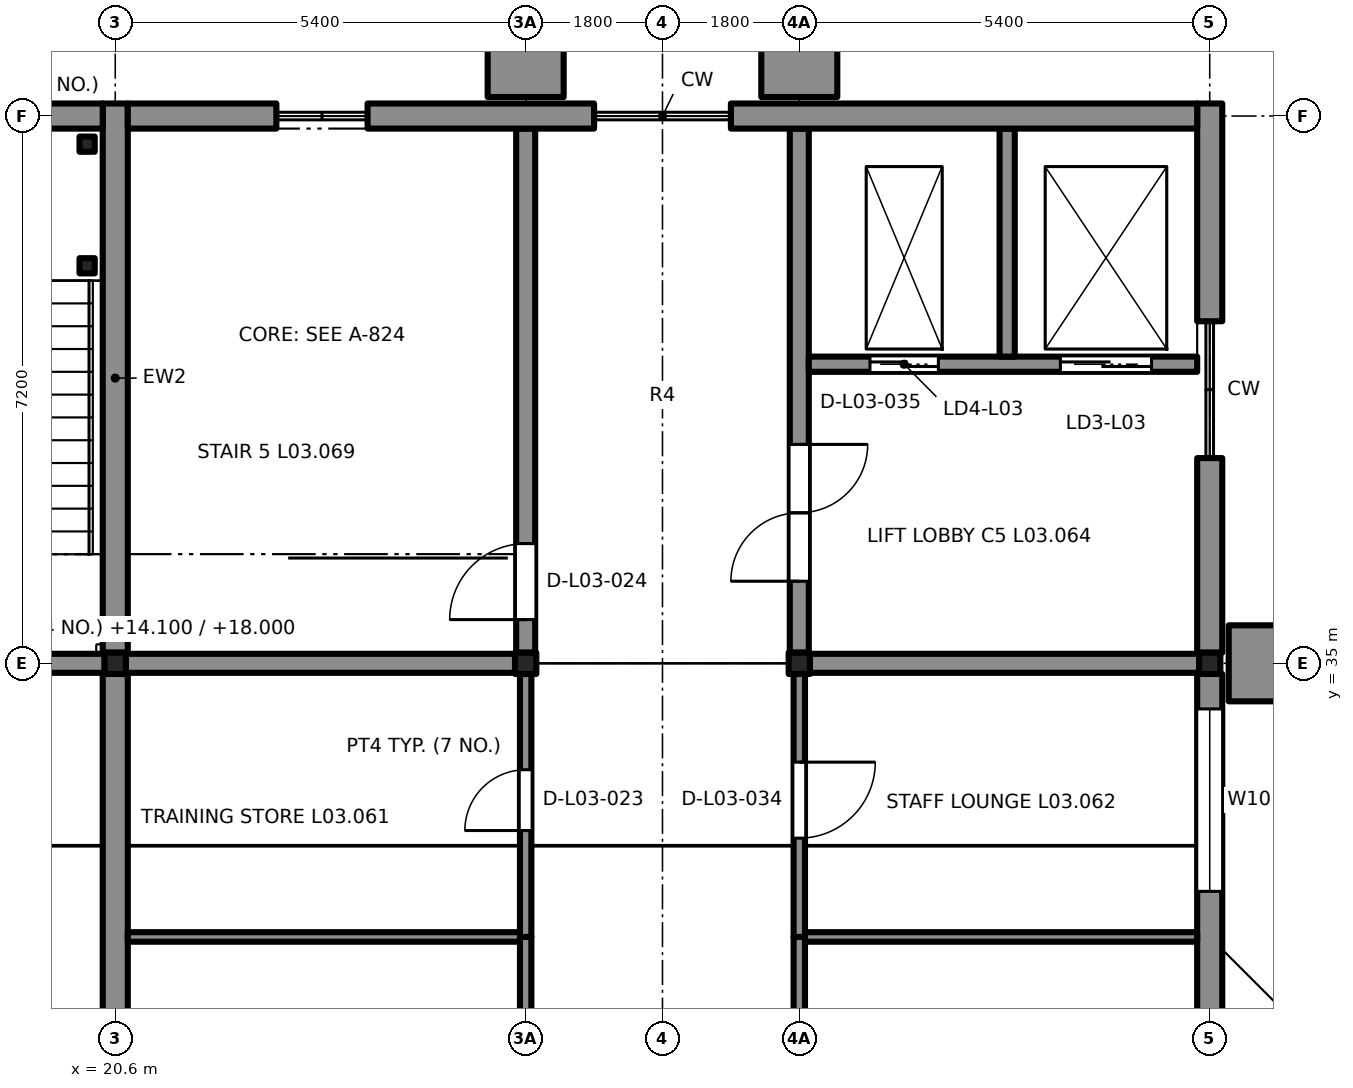
"""IFC4 building model, lengths in metres.
Left out: names, types, materials, properties, quantities, classifications, styles, units other than length and angle.
Written with IfcOpenShell. Run it as: python <this file> out.ifc"""

import sys

from ifc_helpers import new_model, si_unit, direction, frame, frame_2d, origin, origin_2d, place, context, subcontext, project, spatial, rectangle, extrude, element, fill, save


model = new_model("IFC4")
c1 = context("Model", 3, precision=1e-05, world=origin(), true_north=direction((0.0, 1.0)))
c2 = subcontext(c1, "Body", "Model", "MODEL_VIEW")
j1 = project(units=[si_unit("LENGTHUNIT", "METRE"), si_unit("PLANEANGLEUNIT", "RADIAN")], contexts=[c1])
p1 = place(None, origin())
s1 = spatial("IfcSite", under=j1, at=p1, CompositionType="ELEMENT")
p2 = place(p1, origin())
s2 = spatial("IfcBuilding", under=s1, at=p2, CompositionType="ELEMENT")
p3 = place(p2, frame((0.0, 0.0, 14.1)))
s3 = spatial("IfcBuildingStorey", under=s2, at=p3, CompositionType="ELEMENT", Elevation=14.1)
for number, where, z_axis, x_axis in (
    (1, (20.6, 35.0, 0.0), (0.0, 0.0, 1.0), (1.0, 0.0, 0.0)),
    (2, (26.0, 35.0, 0.0), (0.0, 0.0, 1.0), (1.0, 0.0, 0.0)),
    (3, (29.6, 35.0, 0.0), (0.0, 0.0, 1.0), (1.0, 0.0, 0.0)),
    (4, (35.0, 35.0, 0.0), (0.0, 0.0, 1.0), (1.0, 0.0, 0.0)),
):
    element("IfcColumn", number, at=place(p3, frame(where, z_axis=z_axis, x_axis=x_axis)), inside=s3, PredefinedType="COLUMN", context=c2, shape_type="SweptSolid", body=[
        extrude(rectangle(XDim=0.28, YDim=0.28, at=origin_2d()), origin(), (0.0, 0.0, 1.0), 3.9),
    ])
p4 = place(p3, frame((15.34, 35.0, 0.0), z_axis=(0.0, 0.0, 1.0), x_axis=(1.0, 0.0, 0.0)))
e5 = element("IfcWall", 5, at=p4, inside=s3, PredefinedType="SHEAR", context=c2, shape_type="SweptSolid", body=[
    extrude(rectangle(XDim=5.12, YDim=0.25, at=frame_2d((2.56, 0.0))), origin(), (0.0, 0.0, 1.0), 3.2),
])
for number, where, z_axis, x_axis in (
    (6, (20.23, 41.83, 0.0), (0.0, 0.0, 1.0), (1.0, 0.0, 0.0)),
    (7, (20.23, 40.23, 0.0), (0.0, 0.0, 1.0), (1.0, 0.0, 0.0)),
):
    element("IfcColumn", number, at=place(p3, frame(where, z_axis=z_axis, x_axis=x_axis)), inside=s3, PredefinedType="COLUMN", context=c2, shape_type="SweptSolid", body=[
        extrude(rectangle(XDim=0.2, YDim=0.2, at=origin_2d()), origin(), (0.0, 0.0, 1.0), 1.75),
    ])
p5 = place(p3, frame((26.0, 35.14, 0.0), z_axis=(0.0, 0.0, 1.0), x_axis=(0.0, 1.0, 0.0)))
e8 = element("IfcWall", 8, at=p5, inside=s3, PredefinedType="SHEAR", context=c2, shape_type="SweptSolid", body=[
    extrude(rectangle(XDim=6.895, YDim=0.25, at=frame_2d((3.448, 0.0))), origin(), (0.0, 0.0, 1.0), 3.2),
])
p6 = place(p5, frame((0.435, 0.0, 0.0)))
e9 = element("IfcOpeningElement", 9, at=p6, cuts=e8, PredefinedType="OPENING", context=c2, shape_type="SweptSolid", body=[
    extrude(rectangle(XDim=1.0, YDim=2.1, at=frame_2d((0.5, 1.05))), frame((0.0, 0.135, 0.0), z_axis=(0.0, -1.0, 0.0), x_axis=(1.0, 0.0, 0.0)), (0.0, 0.0, 1.0), 0.27),
])
p7 = place(p3, frame((20.74, 35.0, 0.0), z_axis=(0.0, 0.0, 1.0), x_axis=(1.0, 0.0, 0.0)))
e10 = element("IfcWall", 10, at=p7, inside=s3, PredefinedType="SHEAR", context=c2, shape_type="SweptSolid", body=[
    extrude(rectangle(XDim=5.12, YDim=0.25, at=frame_2d((2.56, 0.0))), origin(), (0.0, 0.0, 1.0), 3.2),
])
p8 = place(p3, frame((29.6, 35.14, 0.0), z_axis=(0.0, 0.0, 1.0), x_axis=(0.0, 1.0, 0.0)))
e11 = element("IfcWall", 11, at=p8, inside=s3, PredefinedType="SHEAR", context=c2, shape_type="SweptSolid", body=[
    extrude(rectangle(XDim=6.895, YDim=0.25, at=frame_2d((3.448, 0.0))), origin(), (0.0, 0.0, 1.0), 3.2),
])
p9 = place(p8, frame((0.94, 0.0, 0.0)))
e12 = element("IfcOpeningElement", 12, at=p9, cuts=e11, PredefinedType="OPENING", context=c2, shape_type="SweptSolid", body=[
    extrude(rectangle(XDim=1.8, YDim=2.1, at=frame_2d((0.9, 1.05))), frame((0.0, 0.135, 0.0), z_axis=(0.0, -1.0, 0.0), x_axis=(1.0, 0.0, 0.0)), (0.0, 0.0, 1.0), 0.27),
])
p10 = place(p3, frame((29.74, 35.0, 0.0), z_axis=(0.0, 0.0, 1.0), x_axis=(1.0, 0.0, 0.0)))
e13 = element("IfcWall", 13, at=p10, inside=s3, PredefinedType="SHEAR", context=c2, shape_type="SweptSolid", body=[
    extrude(rectangle(XDim=5.12, YDim=0.25, at=frame_2d((2.56, 0.0))), origin(), (0.0, 0.0, 1.0), 3.2),
])
p11 = place(p3, frame((29.725, 38.935, 0.0), z_axis=(0.0, 0.0, 1.0), x_axis=(1.0, 0.0, 0.0)))
e14 = element("IfcWall", 14, at=p11, inside=s3, PredefinedType="SHEAR", context=c2, shape_type="SweptSolid", body=[
    extrude(rectangle(XDim=5.11, YDim=0.2, at=frame_2d((2.555, 0.0))), origin(), (0.0, 0.0, 1.0), 3.2),
])
p12 = place(p11, frame((3.31, 0.0, 0.0)))
e15 = element("IfcOpeningElement", 15, at=p12, cuts=e14, PredefinedType="OPENING", context=c2, shape_type="SweptSolid", body=[
    extrude(rectangle(XDim=1.2, YDim=2.1, at=frame_2d((0.6, 1.05))), frame((0.0, 0.11, 0.0), z_axis=(0.0, -1.0, 0.0), x_axis=(1.0, 0.0, 0.0)), (0.0, 0.0, 1.0), 0.22),
])
p13 = place(p11, frame((0.805, 0.0, 0.0)))
e16 = element("IfcOpeningElement", 16, at=p13, cuts=e14, PredefinedType="OPENING", context=c2, shape_type="SweptSolid", body=[
    extrude(rectangle(XDim=0.9, YDim=2.1, at=frame_2d((0.45, 1.05))), frame((0.0, 0.11, 0.0), z_axis=(0.0, -1.0, 0.0), x_axis=(1.0, 0.0, 0.0)), (0.0, 0.0, 1.0), 0.22),
])
p14 = place(p3, frame((32.335, 42.035, 0.0), z_axis=(0.0, 0.0, 1.0), x_axis=(0.0, -1.0, 0.0)))
e17 = element("IfcWall", 17, at=p14, inside=s3, PredefinedType="SHEAR", context=c2, shape_type="SweptSolid", body=[
    extrude(rectangle(XDim=3.0, YDim=0.2, at=frame_2d((1.5, 0.0))), origin(), (0.0, 0.0, 1.0), 3.2),
])
p15 = place(p3, frame((20.6, 34.86, 0.0), z_axis=(0.0, 0.0, 1.0), x_axis=(0.0, -1.0, 0.0)))
e18 = element("IfcWall", 18, at=p15, inside=s3, PredefinedType="SOLIDWALL", context=c2, shape_type="SweptSolid", body=[
    extrude(rectangle(XDim=6.92, YDim=0.33, at=frame_2d((3.46, 0.0))), origin(), (0.0, 0.0, 1.0), 3.2),
])
p16 = place(p3, frame((20.6, 42.365, 0.0), z_axis=(0.0, 0.0, 1.0), x_axis=(0.0, -1.0, 0.0)))
e19 = element("IfcWall", 19, at=p16, inside=s3, PredefinedType="SOLIDWALL", context=c2, shape_type="SweptSolid", body=[
    extrude(rectangle(XDim=7.225, YDim=0.33, at=frame_2d((3.613, 0.0))), origin(), (0.0, 0.0, 1.0), 3.2),
])
p17 = place(p3, frame((18.48, 42.2, 0.0), z_axis=(0.0, 0.0, 1.0), x_axis=(1.0, 0.0, 0.0)))
e20 = element("IfcWall", 20, at=p17, inside=s3, PredefinedType="SOLIDWALL", context=c2, shape_type="SweptSolid", body=[
    extrude(rectangle(XDim=1.955, YDim=0.33, at=frame_2d((0.978, 0.0))), origin(), (0.0, 0.0, 1.0), 3.2),
])
p18 = place(p3, frame((35.0, 34.86, 0.0), z_axis=(0.0, 0.0, 1.0), x_axis=(0.0, -1.0, 0.0)))
e21 = element("IfcWall", 21, at=p18, inside=s3, PredefinedType="SOLIDWALL", context=c2, shape_type="SweptSolid", body=[
    extrude(rectangle(XDim=6.92, YDim=0.33, at=frame_2d((3.46, 0.0))), origin(), (0.0, 0.0, 1.0), 3.2),
])
p19 = place(p18, frame((4.66, 0.0, 0.9)))
e22 = element("IfcOpeningElement", 22, at=p19, cuts=e21, PredefinedType="OPENING", context=c2, shape_type="SweptSolid", body=[
    extrude(rectangle(XDim=1.2, YDim=1.5, at=frame_2d((0.6, 0.75))), frame((0.0, 0.175, 0.0), z_axis=(0.0, -1.0, 0.0), x_axis=(1.0, 0.0, 0.0)), (0.0, 0.0, 1.0), 0.35),
])
p20 = place(p18, frame((0.46, 0.0, 0.45)))
e23 = element("IfcOpeningElement", 23, at=p20, cuts=e21, PredefinedType="OPENING", context=c2, shape_type="SweptSolid", body=[
    extrude(rectangle(XDim=2.4, YDim=2.1, at=frame_2d((1.2, 1.05))), frame((0.0, 0.175, 0.0), z_axis=(0.0, -1.0, 0.0), x_axis=(1.0, 0.0, 0.0)), (0.0, 0.0, 1.0), 0.35),
])
p21 = place(p3, frame((35.0, 37.7, 0.0), z_axis=(0.0, 0.0, 1.0), x_axis=(0.0, -1.0, 0.0)))
e24 = element("IfcWall", 24, at=p21, inside=s3, PredefinedType="SOLIDWALL", context=c2, shape_type="SweptSolid", body=[
    extrude(rectangle(XDim=2.56, YDim=0.33, at=frame_2d((1.28, 0.0))), origin(), (0.0, 0.0, 1.0), 3.2),
])
p22 = place(p3, frame((35.0, 42.365, 0.0), z_axis=(0.0, 0.0, 1.0), x_axis=(0.0, -1.0, 0.0)))
e25 = element("IfcWall", 25, at=p22, inside=s3, PredefinedType="SOLIDWALL", context=c2, shape_type="SweptSolid", body=[
    extrude(rectangle(XDim=2.865, YDim=0.33, at=frame_2d((1.433, 0.0))), origin(), (0.0, 0.0, 1.0), 3.2),
])
p23 = place(p3, frame((35.625, 35.5, 0.0), z_axis=(0.0, 0.0, 1.0), x_axis=(0.0, -1.0, 0.0)))
e26 = element("IfcWall", 26, at=p23, inside=s3, PredefinedType="SOLIDWALL", context=c2, shape_type="SweptSolid", body=[
    extrude(rectangle(XDim=1.0, YDim=0.75, at=frame_2d((0.5, 0.0))), origin(), (0.0, 0.0, 1.0), 3.9),
])
p24 = place(p3, frame((20.765, 42.2, 0.0), z_axis=(0.0, 0.0, 1.0), x_axis=(1.0, 0.0, 0.0)))
e27 = element("IfcWall", 27, at=p24, inside=s3, PredefinedType="SOLIDWALL", context=c2, shape_type="SweptSolid", body=[
    extrude(rectangle(XDim=1.955, YDim=0.33, at=frame_2d((0.978, 0.0))), origin(), (0.0, 0.0, 1.0), 3.2),
])
p25 = place(p3, frame((23.92, 42.2, 0.0), z_axis=(0.0, 0.0, 1.0), x_axis=(1.0, 0.0, 0.0)))
e28 = element("IfcWall", 28, at=p25, inside=s3, PredefinedType="SOLIDWALL", context=c2, shape_type="SweptSolid", body=[
    extrude(rectangle(XDim=2.98, YDim=0.33, at=frame_2d((1.49, 0.0))), origin(), (0.0, 0.0, 1.0), 3.2),
])
p26 = place(p3, frame((28.7, 42.2, 0.0), z_axis=(0.0, 0.0, 1.0), x_axis=(1.0, 0.0, 0.0)))
e29 = element("IfcWall", 29, at=p26, inside=s3, PredefinedType="SOLIDWALL", context=c2, shape_type="SweptSolid", body=[
    extrude(rectangle(XDim=6.135, YDim=0.33, at=frame_2d((3.067, 0.0))), origin(), (0.0, 0.0, 1.0), 3.2),
])
for number, where, z_axis, x_axis in (
    (30, (25.5, 42.825, 0.0), (0.0, 0.0, 1.0), (1.0, 0.0, 0.0)),
    (31, (29.1, 42.825, 0.0), (0.0, 0.0, 1.0), (1.0, 0.0, 0.0)),
):
    element("IfcWall", number, at=place(p3, frame(where, z_axis=z_axis, x_axis=x_axis)), inside=s3, PredefinedType="SOLIDWALL", context=c2, shape_type="SweptSolid", body=[
        extrude(rectangle(XDim=1.0, YDim=0.75, at=frame_2d((0.5, 0.0))), origin(), (0.0, 0.0, 1.0), 3.9),
    ])
p27 = place(p3, frame((22.1, 42.15, 3.9), z_axis=(0.0, 0.0, 1.0), x_axis=(1.0, 0.0, 0.0)))
e32 = element("IfcWall", 32, at=p27, inside=s3, PredefinedType="SOLIDWALL", context=c2, shape_type="SweptSolid", body=[
    extrude(rectangle(XDim=1.5, YDim=0.23, at=frame_2d((0.75, 0.0))), origin(), (0.0, 0.0, 1.0), 2.4),
])
p28 = place(p3, frame((23.6, 42.15, 3.9), z_axis=(0.0, 0.0, 1.0), x_axis=(1.0, 0.0, 0.0)))
e33 = element("IfcWall", 33, at=p28, inside=s3, PredefinedType="SOLIDWALL", context=c2, shape_type="SweptSolid", body=[
    extrude(rectangle(XDim=1.2, YDim=0.23, at=frame_2d((0.6, 0.0))), origin(), (0.0, 0.0, 1.0), 3.4),
])
p29 = place(p3, frame((24.8, 42.15, 3.9), z_axis=(0.0, 0.0, 1.0), x_axis=(1.0, 0.0, 0.0)))
e34 = element("IfcWall", 34, at=p29, inside=s3, PredefinedType="SOLIDWALL", context=c2, shape_type="SweptSolid", body=[
    extrude(rectangle(XDim=1.5, YDim=0.23, at=frame_2d((0.75, 0.0))), origin(), (0.0, 0.0, 1.0), 2.4),
])
for number, where, z_axis, x_axis in (
    (35, (26.3, 42.15, 3.9), (0.0, 0.0, 1.0), (1.0, 0.0, 0.0)),
    (36, (27.8, 42.15, 3.9), (0.0, 0.0, 1.0), (1.0, 0.0, 0.0)),
):
    element("IfcWall", number, at=place(p3, frame(where, z_axis=z_axis, x_axis=x_axis)), inside=s3, PredefinedType="SOLIDWALL", context=c2, shape_type="SweptSolid", body=[
        extrude(rectangle(XDim=1.5, YDim=0.23, at=frame_2d((0.75, 0.0))), origin(), (0.0, 0.0, 1.0), 1.4),
    ])
p30 = place(p3, frame((35.0, 30.8, 3.2), z_axis=(0.0, 0.0, 1.0), x_axis=(0.0, -1.0, 0.0)))
e37 = element("IfcWall", 37, at=p30, inside=s3, PredefinedType="SOLIDWALL", context=c2, shape_type="SweptSolid", body=[
    extrude(rectangle(XDim=1.5, YDim=0.23, at=frame_2d((0.75, 0.0))), origin(), (0.0, 0.0, 1.0), 3.1),
])
p31 = place(p3, frame((35.0, 32.0, 3.2), z_axis=(0.0, 0.0, 1.0), x_axis=(0.0, -1.0, 0.0)))
e38 = element("IfcWall", 38, at=p31, inside=s3, PredefinedType="SOLIDWALL", context=c2, shape_type="SweptSolid", body=[
    extrude(rectangle(XDim=1.2, YDim=0.23, at=frame_2d((0.6, 0.0))), origin(), (0.0, 0.0, 1.0), 4.1),
])
p32 = place(p3, frame((35.0, 33.5, 3.2), z_axis=(0.0, 0.0, 1.0), x_axis=(0.0, -1.0, 0.0)))
e39 = element("IfcWall", 39, at=p32, inside=s3, PredefinedType="SOLIDWALL", context=c2, shape_type="SweptSolid", body=[
    extrude(rectangle(XDim=1.5, YDim=0.23, at=frame_2d((0.75, 0.0))), origin(), (0.0, 0.0, 1.0), 3.1),
])
p33 = place(p3, frame((35.0, 34.86, 3.2), z_axis=(0.0, 0.0, 1.0), x_axis=(0.0, -1.0, 0.0)))
e40 = element("IfcWall", 40, at=p33, inside=s3, PredefinedType="SOLIDWALL", context=c2, shape_type="SweptSolid", body=[
    extrude(rectangle(XDim=1.36, YDim=0.23, at=frame_2d((0.68, 0.0))), origin(), (0.0, 0.0, 1.0), 2.1),
])
p34 = place(p3, frame((26.0, 27.94, 0.0), z_axis=(0.0, 0.0, 1.0), x_axis=(0.0, 1.0, 0.0)))
e41 = element("IfcWall", 41, at=p34, inside=s3, PredefinedType="PARTITIONING", context=c2, shape_type="SweptSolid", body=[
    extrude(rectangle(XDim=3.46, YDim=0.15, at=frame_2d((1.73, 0.0))), origin(), (0.0, 0.0, 1.0), 5.233),
])
p35 = place(p34, frame((1.16, 0.0, 0.0)))
e42 = element("IfcOpeningElement", 42, at=p35, cuts=e41, PredefinedType="OPENING", context=c2, shape_type="SweptSolid", body=[
    extrude(rectangle(XDim=1.0, YDim=2.1, at=frame_2d((0.5, 1.05))), frame((0.0, 0.085, 0.0), z_axis=(0.0, -1.0, 0.0), x_axis=(1.0, 0.0, 0.0)), (0.0, 0.0, 1.0), 0.17),
])
p36 = place(p3, frame((26.0, 31.4, 0.0), z_axis=(0.0, 0.0, 1.0), x_axis=(0.0, 1.0, 0.0)))
e43 = element("IfcWall", 43, at=p36, inside=s3, PredefinedType="PARTITIONING", context=c2, shape_type="SweptSolid", body=[
    extrude(rectangle(XDim=3.46, YDim=0.15, at=frame_2d((1.73, 0.0))), origin(), (0.0, 0.0, 1.0), 5.233),
])
p37 = place(p36, frame((1.4, 0.0, 0.0)))
e44 = element("IfcOpeningElement", 44, at=p37, cuts=e43, PredefinedType="OPENING", context=c2, shape_type="SweptSolid", body=[
    extrude(rectangle(XDim=0.8, YDim=2.1, at=frame_2d((0.4, 1.05))), frame((0.0, 0.085, 0.0), z_axis=(0.0, -1.0, 0.0), x_axis=(1.0, 0.0, 0.0)), (0.0, 0.0, 1.0), 0.17),
])
p38 = place(p3, frame((20.765, 31.4, 0.0), z_axis=(0.0, 0.0, 1.0), x_axis=(1.0, 0.0, 0.0)))
e45 = element("IfcWall", 45, at=p38, inside=s3, PredefinedType="PARTITIONING", context=c2, shape_type="SweptSolid", body=[
    extrude(rectangle(XDim=5.16, YDim=0.125, at=frame_2d((2.58, 0.0))), origin(), (0.0, 0.0, 1.0), 5.233),
])
p39 = place(p3, frame((29.6, 31.4, 0.0), z_axis=(0.0, 0.0, 1.0), x_axis=(0.0, -1.0, 0.0)))
e46 = element("IfcWall", 46, at=p39, inside=s3, PredefinedType="PARTITIONING", context=c2, shape_type="SweptSolid", body=[
    extrude(rectangle(XDim=3.46, YDim=0.15, at=frame_2d((1.73, 0.0))), origin(), (0.0, 0.0, 1.0), 5.233),
])
p40 = place(p39, frame((1.3, 0.0, 0.0)))
e47 = element("IfcOpeningElement", 47, at=p40, cuts=e46, PredefinedType="OPENING", context=c2, shape_type="SweptSolid", body=[
    extrude(rectangle(XDim=1.0, YDim=2.1, at=frame_2d((0.5, 1.05))), frame((0.0, 0.085, 0.0), z_axis=(0.0, -1.0, 0.0), x_axis=(1.0, 0.0, 0.0)), (0.0, 0.0, 1.0), 0.17),
])
p41 = place(p3, frame((29.6, 34.86, 0.0), z_axis=(0.0, 0.0, 1.0), x_axis=(0.0, -1.0, 0.0)))
e48 = element("IfcWall", 48, at=p41, inside=s3, PredefinedType="PARTITIONING", context=c2, shape_type="SweptSolid", body=[
    extrude(rectangle(XDim=3.46, YDim=0.15, at=frame_2d((1.73, 0.0))), origin(), (0.0, 0.0, 1.0), 5.233),
])
p42 = place(p41, frame((1.16, 0.0, 0.0)))
e49 = element("IfcOpeningElement", 49, at=p42, cuts=e48, PredefinedType="OPENING", context=c2, shape_type="SweptSolid", body=[
    extrude(rectangle(XDim=1.0, YDim=2.1, at=frame_2d((0.5, 1.05))), frame((0.0, 0.085, 0.0), z_axis=(0.0, -1.0, 0.0), x_axis=(1.0, 0.0, 0.0)), (0.0, 0.0, 1.0), 0.17),
])
p43 = place(p3, frame((34.835, 31.4, 0.0), z_axis=(0.0, 0.0, 1.0), x_axis=(-1.0, 0.0, 0.0)))
e50 = element("IfcWall", 50, at=p43, inside=s3, PredefinedType="PARTITIONING", context=c2, shape_type="SweptSolid", body=[
    extrude(rectangle(XDim=5.16, YDim=0.125, at=frame_2d((2.58, 0.0))), origin(), (0.0, 0.0, 1.0), 5.233),
])
p44 = place(p6, origin())
e51 = element("IfcDoor", 51, at=p44, inside=s3, OperationType="SINGLE_SWING_LEFT", PredefinedType="DOOR", context=c2, shape_type="SweptSolid", body=[
    extrude(rectangle(XDim=1.0, YDim=2.1, at=frame_2d((0.5, 1.05))), frame((0.0, 0.025, 0.0), z_axis=(0.0, -1.0, 0.0), x_axis=(1.0, 0.0, 0.0)), (0.0, 0.0, 1.0), 0.05),
])
fill(e9, e51)
p45 = place(p9, origin())
e52 = element("IfcDoor", 52, at=p45, inside=s3, OperationType="DOUBLE_DOOR_SINGLE_SWING", PredefinedType="DOOR", context=c2, shape_type="SweptSolid", body=[
    extrude(rectangle(XDim=1.8, YDim=2.1, at=frame_2d((0.9, 1.05))), frame((0.0, 0.025, 0.0), z_axis=(0.0, -1.0, 0.0), x_axis=(1.0, 0.0, 0.0)), (0.0, 0.0, 1.0), 0.05),
])
fill(e12, e52)
p46 = place(p12, origin())
e53 = element("IfcDoor", 53, at=p46, inside=s3, OperationType="DOUBLE_DOOR_SLIDING", PredefinedType="DOOR", context=c2, shape_type="SweptSolid", body=[
    extrude(rectangle(XDim=1.2, YDim=2.1, at=frame_2d((0.6, 1.05))), frame((0.0, 0.025, 0.0), z_axis=(0.0, -1.0, 0.0), x_axis=(1.0, 0.0, 0.0)), (0.0, 0.0, 1.0), 0.05),
])
fill(e15, e53)
p47 = place(p13, origin())
e54 = element("IfcDoor", 54, at=p47, inside=s3, OperationType="DOUBLE_DOOR_SLIDING", PredefinedType="DOOR", context=c2, shape_type="SweptSolid", body=[
    extrude(rectangle(XDim=0.9, YDim=2.1, at=frame_2d((0.45, 1.05))), frame((0.0, 0.025, 0.0), z_axis=(0.0, -1.0, 0.0), x_axis=(1.0, 0.0, 0.0)), (0.0, 0.0, 1.0), 0.05),
])
fill(e16, e54)
p48 = place(p20, origin())
e55 = element("IfcWindow", 55, at=p48, inside=s3, PartitioningType="SINGLE_PANEL", PredefinedType="WINDOW", context=c2, shape_type="SweptSolid", body=[
    extrude(rectangle(XDim=2.4, YDim=2.1, at=frame_2d((1.2, 1.05))), frame((0.0, -0.03, 0.0), z_axis=(0.0, -1.0, 0.0), x_axis=(1.0, 0.0, 0.0)), (0.0, 0.0, 1.0), 0.06),
])
fill(e23, e55)
p49 = place(p37, origin())
e56 = element("IfcDoor", 56, at=p49, inside=s3, OperationType="SINGLE_SWING_RIGHT", PredefinedType="DOOR", context=c2, shape_type="SweptSolid", body=[
    extrude(rectangle(XDim=0.8, YDim=2.1, at=frame_2d((0.4, 1.05))), frame((0.0, 0.025, 0.0), z_axis=(0.0, -1.0, 0.0), x_axis=(1.0, 0.0, 0.0)), (0.0, 0.0, 1.0), 0.05),
])
fill(e44, e56)
p50 = place(p42, origin())
e57 = element("IfcDoor", 57, at=p50, inside=s3, OperationType="SINGLE_SWING_LEFT", PredefinedType="DOOR", context=c2, shape_type="SweptSolid", body=[
    extrude(rectangle(XDim=1.0, YDim=2.1, at=frame_2d((0.5, 1.05))), frame((0.0, 0.025, 0.0), z_axis=(0.0, -1.0, 0.0), x_axis=(1.0, 0.0, 0.0)), (0.0, 0.0, 1.0), 0.05),
])
fill(e49, e57)
save(model, sys.argv[1])
